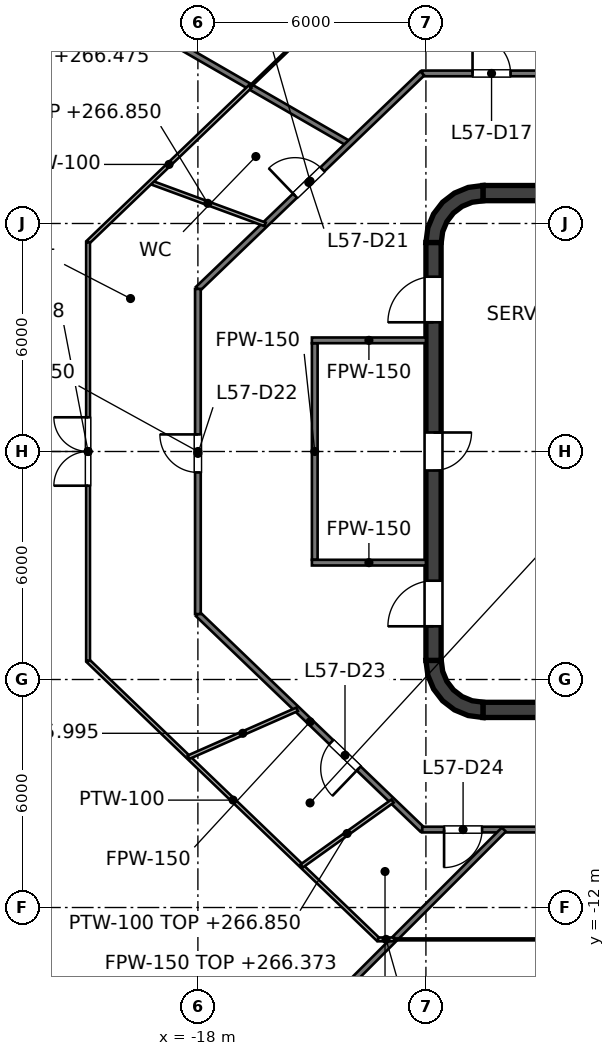
"""IFC4 building model, lengths in metres.
Left out: names, types, materials, properties, quantities, classifications, styles, units other than length and angle.
Written with IfcOpenShell. Run it as: python <this file> out.ifc"""

import sys

from ifc_helpers import new_model, si_unit, direction, frame, frame_2d, origin, place, context, subcontext, project, spatial, polyline, rectangle, outline, extrude, element, fill, save


model = new_model("IFC4")
c1 = context("Model", 3, precision=1e-05, world=origin(), true_north=direction((0.0, 1.0)))
c2 = subcontext(c1, "Body", "Model", "MODEL_VIEW")
j1 = project(units=[si_unit("LENGTHUNIT", "METRE"), si_unit("PLANEANGLEUNIT", "RADIAN")], contexts=[c1])
p1 = place(None, origin())
s1 = spatial("IfcSite", under=j1, at=p1, CompositionType="ELEMENT")
p2 = place(p1, origin())
s2 = spatial("IfcBuilding", under=s1, at=p2, CompositionType="ELEMENT")
p3 = place(p2, frame((0.0, 0.0, 263.0)))
s3 = spatial("IfcBuildingStorey", under=s2, at=p3, CompositionType="ELEMENT", Elevation=263.0)
for number, where, z_axis, x_axis in (
    (1, (-10.5, 6.8, 0.0), (0.0, 0.0, 1.0), (1.0, 0.0, 0.0)),
    (2, (-10.5, -6.8, 0.0), (0.0, 0.0, 1.0), (1.0, 0.0, 0.0)),
):
    element("IfcWall", number, at=place(p3, frame(where, z_axis=z_axis, x_axis=x_axis)), inside=s3, PredefinedType="SHEAR", context=c2, shape_type="SweptSolid", body=[
        extrude(rectangle(XDim=21.0, YDim=0.4, at=frame_2d((10.5, 0.0))), origin(), (0.0, 0.0, 1.0), 4.0),
    ])
p4 = place(p3, frame((-11.8, -5.5, 0.0), z_axis=(0.0, 0.0, 1.0), x_axis=(0.0, 1.0, 0.0)))
e3 = element("IfcWall", 3, at=p4, inside=s3, PredefinedType="SHEAR", context=c2, shape_type="SweptSolid", body=[
    extrude(rectangle(XDim=11.0, YDim=0.4, at=frame_2d((5.5, 0.0))), origin(), (0.0, 0.0, 1.0), 4.0),
])
p5 = place(p4, frame((5.0, 0.0, 0.0)))
e4 = element("IfcOpeningElement", 4, at=p5, cuts=e3, PredefinedType="OPENING", context=c2, shape_type="SweptSolid", body=[
    extrude(rectangle(XDim=1.0, YDim=2.1, at=frame_2d((0.5, 1.05))), frame((0.0, 0.2, 0.0), z_axis=(0.0, -1.0, 0.0), x_axis=(1.0, 0.0, 0.0)), (0.0, 0.0, 1.0), 0.4),
])
p6 = place(p4, frame((0.9, 0.0, 0.0)))
e5 = element("IfcOpeningElement", 5, at=p6, cuts=e3, PredefinedType="OPENING", context=c2, shape_type="SweptSolid", body=[
    extrude(rectangle(XDim=1.2, YDim=2.1, at=frame_2d((0.6, 1.05))), frame((0.0, 0.2, 0.0), z_axis=(0.0, -1.0, 0.0), x_axis=(1.0, 0.0, 0.0)), (0.0, 0.0, 1.0), 0.4),
])
p7 = place(p4, frame((8.9, 0.0, 0.0)))
e6 = element("IfcOpeningElement", 6, at=p7, cuts=e3, PredefinedType="OPENING", context=c2, shape_type="SweptSolid", body=[
    extrude(rectangle(XDim=1.2, YDim=2.1, at=frame_2d((0.6, 1.05))), frame((0.0, 0.2, 0.0), z_axis=(0.0, -1.0, 0.0), x_axis=(1.0, 0.0, 0.0)), (0.0, 0.0, 1.0), 0.4),
])
p8 = place(p3, origin())
e7 = element("IfcWall", 7, at=p8, inside=s3, PredefinedType="SHEAR", context=c2, shape_type="SweptSolid", body=[
    extrude(outline(polyline([(-12.0, 5.5), (-11.596, 5.5), (-11.559, 5.784), (-11.45, 6.048), (-11.275, 6.275), (-11.048, 6.45), (-10.784, 6.559), (-10.5, 6.596), (-10.5, 7.0), (-10.888, 6.949), (-11.25, 6.799), (-11.561, 6.561), (-11.799, 6.25), (-11.949, 5.888), (-12.0, 5.5)])), origin(), (0.0, 0.0, 1.0), 4.0),
])
e8 = element("IfcWall", 8, at=p8, inside=s3, PredefinedType="SHEAR", context=c2, shape_type="SweptSolid", body=[
    extrude(outline(polyline([(-10.5, -7.0), (-10.5, -6.596), (-10.784, -6.559), (-11.048, -6.45), (-11.275, -6.275), (-11.45, -6.048), (-11.559, -5.784), (-11.596, -5.5), (-12.0, -5.5), (-11.949, -5.888), (-11.799, -6.25), (-11.561, -6.561), (-11.25, -6.799), (-10.888, -6.949), (-10.5, -7.0)])), origin(), (0.0, 0.0, 1.0), 4.0),
])
p9 = place(p3, frame((-14.925, -2.85, 0.0), z_axis=(0.0, 0.0, 1.0), x_axis=(0.0, 1.0, 0.0)))
e9 = element("IfcWall", 9, at=p9, inside=s3, PredefinedType="PARTITIONING", context=c2, shape_type="SweptSolid", body=[
    extrude(rectangle(XDim=5.7, YDim=0.15, at=frame_2d((2.85, 0.0))), origin(), (0.0, 0.0, 1.0), 2.918),
])
for number, where, z_axis, x_axis in (
    (10, (-15.0, 2.925, 0.0), (0.0, 0.0, 1.0), (1.0, 0.0, 0.0)),
    (11, (-15.0, -2.925, 0.0), (0.0, 0.0, 1.0), (1.0, 0.0, 0.0)),
):
    element("IfcWall", number, at=place(p3, frame(where, z_axis=z_axis, x_axis=x_axis)), inside=s3, PredefinedType="PARTITIONING", context=c2, shape_type="SweptSolid", body=[
        extrude(rectangle(XDim=3.0, YDim=0.15, at=frame_2d((1.5, 0.0))), origin(), (0.0, 0.0, 1.0), 2.918),
    ])
p10 = place(p3, frame((-18.0, -4.278, 0.0), z_axis=(0.0, 0.0, 1.0), x_axis=(0.721290181137, -0.692633001376, 0.0)))
e12 = element("IfcWall", 12, at=p10, inside=s3, PredefinedType="PARTITIONING", context=c2, shape_type="SweptSolid", body=[
    extrude(rectangle(XDim=8.187, YDim=0.15, at=frame_2d((4.094, 0.0))), origin(), (0.0, 0.0, 1.0), 2.918),
])
p11 = place(p10, frame((4.866, 0.0, 0.0)))
e13 = element("IfcOpeningElement", 13, at=p11, cuts=e12, PredefinedType="OPENING", context=c2, shape_type="SweptSolid", body=[
    extrude(rectangle(XDim=1.0, YDim=2.1, at=frame_2d((0.5, 1.05))), frame((0.0, 0.075, 0.0), z_axis=(0.0, -1.0, 0.0), x_axis=(1.0, 0.0, 0.0)), (0.0, 0.0, 1.0), 0.15),
])
p12 = place(p3, frame((-23.976, 13.843, 0.0), z_axis=(0.0, 0.0, 1.0), x_axis=(0.866017183011, -0.500014238528, 0.0)))
e14 = element("IfcWall", 14, at=p12, inside=s3, PredefinedType="PARTITIONING", context=c2, shape_type="SweptSolid", body=[
    extrude(rectangle(XDim=11.492, YDim=0.15, at=frame_2d((5.746, 0.0))), origin(), (0.0, 0.0, 1.0), 3.475),
])
p13 = place(p3, frame((-12.095, -9.949, 0.0), z_axis=(0.0, 0.0, 1.0), x_axis=(1.0, 0.0, 0.0)))
e15 = element("IfcWall", 15, at=p13, inside=s3, PredefinedType="PARTITIONING", context=c2, shape_type="SweptSolid", body=[
    extrude(rectangle(XDim=24.19, YDim=0.15, at=frame_2d((12.095, 0.0))), origin(), (0.0, 0.0, 1.0), 2.927),
])
p14 = place(p13, frame((0.573, 0.0, 0.0)))
e16 = element("IfcOpeningElement", 16, at=p14, cuts=e15, PredefinedType="OPENING", context=c2, shape_type="SweptSolid", body=[
    extrude(rectangle(XDim=1.0, YDim=2.1, at=frame_2d((0.5, 1.05))), frame((0.0, 0.075, 0.0), z_axis=(0.0, -1.0, 0.0), x_axis=(1.0, 0.0, 0.0)), (0.0, 0.0, 1.0), 0.15),
])
p15 = place(p13, frame((5.966, 0.0, 0.0)))
e17 = element("IfcOpeningElement", 17, at=p15, cuts=e15, PredefinedType="OPENING", context=c2, shape_type="SweptSolid", body=[
    extrude(rectangle(XDim=1.0, YDim=2.1, at=frame_2d((0.5, 1.05))), frame((0.0, 0.075, 0.0), z_axis=(0.0, -1.0, 0.0), x_axis=(1.0, 0.0, 0.0)), (0.0, 0.0, 1.0), 0.15),
])
p16 = place(p13, frame((13.812, 0.0, 0.0)))
e18 = element("IfcOpeningElement", 18, at=p16, cuts=e15, PredefinedType="OPENING", context=c2, shape_type="SweptSolid", body=[
    extrude(rectangle(XDim=1.0, YDim=2.1, at=frame_2d((0.5, 1.05))), frame((0.0, 0.075, 0.0), z_axis=(0.0, -1.0, 0.0), x_axis=(1.0, 0.0, 0.0)), (0.0, 0.0, 1.0), 0.15),
])
p17 = place(p13, frame((19.879, 0.0, 0.0)))
e19 = element("IfcOpeningElement", 19, at=p17, cuts=e15, PredefinedType="OPENING", context=c2, shape_type="SweptSolid", body=[
    extrude(rectangle(XDim=1.0, YDim=2.1, at=frame_2d((0.5, 1.05))), frame((0.0, 0.075, 0.0), z_axis=(0.0, -1.0, 0.0), x_axis=(1.0, 0.0, 0.0)), (0.0, 0.0, 1.0), 0.15),
])
p18 = place(p3, frame((-12.095, 9.949, 0.0), z_axis=(0.0, 0.0, 1.0), x_axis=(1.0, 0.0, 0.0)))
e20 = element("IfcWall", 20, at=p18, inside=s3, PredefinedType="PARTITIONING", context=c2, shape_type="SweptSolid", body=[
    extrude(rectangle(XDim=24.19, YDim=0.15, at=frame_2d((12.095, 0.0))), origin(), (0.0, 0.0, 1.0), 2.927),
])
p19 = place(p18, frame((9.784, 0.0, 0.0)))
e21 = element("IfcOpeningElement", 21, at=p19, cuts=e20, PredefinedType="OPENING", context=c2, shape_type="SweptSolid", body=[
    extrude(rectangle(XDim=1.0, YDim=2.1, at=frame_2d((0.5, 1.05))), frame((0.0, 0.075, 0.0), z_axis=(0.0, -1.0, 0.0), x_axis=(1.0, 0.0, 0.0)), (0.0, 0.0, 1.0), 0.15),
])
p20 = place(p18, frame((5.56, 0.0, 0.0)))
e22 = element("IfcOpeningElement", 22, at=p20, cuts=e20, PredefinedType="OPENING", context=c2, shape_type="SweptSolid", body=[
    extrude(rectangle(XDim=1.0, YDim=2.1, at=frame_2d((0.5, 1.05))), frame((0.0, 0.075, 0.0), z_axis=(0.0, -1.0, 0.0), x_axis=(1.0, 0.0, 0.0)), (0.0, 0.0, 1.0), 0.15),
])
p21 = place(p18, frame((1.322, 0.0, 0.0)))
e23 = element("IfcOpeningElement", 23, at=p21, cuts=e20, PredefinedType="OPENING", context=c2, shape_type="SweptSolid", body=[
    extrude(rectangle(XDim=1.0, YDim=2.1, at=frame_2d((0.5, 1.05))), frame((0.0, 0.075, 0.0), z_axis=(0.0, -1.0, 0.0), x_axis=(1.0, 0.0, 0.0)), (0.0, 0.0, 1.0), 0.15),
])
p22 = place(p18, frame((19.104, 0.0, 0.0)))
e24 = element("IfcOpeningElement", 24, at=p22, cuts=e20, PredefinedType="OPENING", context=c2, shape_type="SweptSolid", body=[
    extrude(rectangle(XDim=1.0, YDim=2.1, at=frame_2d((0.5, 1.05))), frame((0.0, 0.075, 0.0), z_axis=(0.0, -1.0, 0.0), x_axis=(1.0, 0.0, 0.0)), (0.0, 0.0, 1.0), 0.15),
])
p23 = place(p18, frame((14.129, 0.0, 0.0)))
e25 = element("IfcOpeningElement", 25, at=p23, cuts=e20, PredefinedType="OPENING", context=c2, shape_type="SweptSolid", body=[
    extrude(rectangle(XDim=1.0, YDim=2.1, at=frame_2d((0.5, 1.05))), frame((0.0, 0.075, 0.0), z_axis=(0.0, -1.0, 0.0), x_axis=(1.0, 0.0, 0.0)), (0.0, 0.0, 1.0), 0.15),
])
p24 = place(p3, frame((-18.0, 4.278, 0.0), z_axis=(0.0, 0.0, 1.0), x_axis=(0.721260976692, 0.69266341285, 0.0)))
e26 = element("IfcWall", 26, at=p24, inside=s3, PredefinedType="PARTITIONING", context=c2, shape_type="SweptSolid", body=[
    extrude(rectangle(XDim=8.187, YDim=0.15, at=frame_2d((4.094, 0.0))), origin(), (0.0, 0.0, 1.0), 2.918),
])
p25 = place(p24, frame((3.544, 0.0, 0.0)))
e27 = element("IfcOpeningElement", 27, at=p25, cuts=e26, PredefinedType="OPENING", context=c2, shape_type="SweptSolid", body=[
    extrude(rectangle(XDim=1.0, YDim=2.1, at=frame_2d((0.5, 1.05))), frame((0.0, 0.075, 0.0), z_axis=(0.0, -1.0, 0.0), x_axis=(1.0, 0.0, 0.0)), (0.0, 0.0, 1.0), 0.15),
])
p26 = place(p3, frame((-18.206, -18.206, 0.0), z_axis=(0.0, 0.0, 1.0), x_axis=(0.707106781187, 0.707106781187, 0.0)))
e28 = element("IfcWall", 28, at=p26, inside=s3, PredefinedType="PARTITIONING", context=c2, shape_type="SweptSolid", body=[
    extrude(rectangle(XDim=11.677, YDim=0.15, at=frame_2d((5.839, 0.0))), origin(), (0.0, 0.0, 1.0), 3.373),
])
p27 = place(p3, frame((-18.0, -4.278, 0.0), z_axis=(0.0, 0.0, 1.0), x_axis=(0.0, 1.0, 0.0)))
e29 = element("IfcWall", 29, at=p27, inside=s3, PredefinedType="PARTITIONING", context=c2, shape_type="SweptSolid", body=[
    extrude(rectangle(XDim=8.556, YDim=0.15, at=frame_2d((4.278, 0.0))), origin(), (0.0, 0.0, 1.0), 2.918),
])
p28 = place(p27, frame((3.728, 0.0, 0.0)))
e30 = element("IfcOpeningElement", 30, at=p28, cuts=e29, PredefinedType="OPENING", context=c2, shape_type="SweptSolid", body=[
    extrude(rectangle(XDim=1.0, YDim=2.1, at=frame_2d((0.5, 1.05))), frame((0.0, 0.075, 0.0), z_axis=(0.0, -1.0, 0.0), x_axis=(1.0, 0.0, 0.0)), (0.0, 0.0, 1.0), 0.15),
])
p29 = place(p3, frame((-10.773, 12.839, 0.0), z_axis=(0.0, 0.0, 1.0), x_axis=(0.642777681898, -0.766052773413, 0.0)))
e31 = element("IfcWall", 31, at=p29, inside=s3, PredefinedType="PARTITIONING", context=c2, shape_type="SweptSolid", body=[
    extrude(rectangle(XDim=3.773, YDim=0.05, at=frame_2d((1.886, 0.0))), origin(), (0.0, 0.0, 1.0), 3.85),
])
p30 = place(p3, frame((-12.839, -12.839, 0.0), z_axis=(0.0, 0.0, 1.0), x_axis=(1.0, 0.0, 0.0)))
e32 = element("IfcWall", 32, at=p30, inside=s3, PredefinedType="PARTITIONING", context=c2, shape_type="SweptSolid", body=[
    extrude(rectangle(XDim=20.252, YDim=0.05, at=frame_2d((10.126, 0.0))), origin(), (0.0, 0.0, 1.0), 2.927),
])
p31 = place(p30, frame((5.024, 0.0, 0.0)))
e33 = element("IfcOpeningElement", 33, at=p31, cuts=e32, PredefinedType="OPENING", context=c2, shape_type="SweptSolid", body=[
    extrude(rectangle(XDim=1.0, YDim=2.1, at=frame_2d((0.5, 1.05))), frame((0.0, 0.025, 0.0), z_axis=(0.0, -1.0, 0.0), x_axis=(1.0, 0.0, 0.0)), (0.0, 0.0, 1.0), 0.05),
])
p32 = place(p30, frame((16.045, 0.0, 0.0)))
e34 = element("IfcOpeningElement", 34, at=p32, cuts=e32, PredefinedType="OPENING", context=c2, shape_type="SweptSolid", body=[
    extrude(rectangle(XDim=1.0, YDim=2.1, at=frame_2d((0.5, 1.05))), frame((0.0, 0.025, 0.0), z_axis=(0.0, -1.0, 0.0), x_axis=(1.0, 0.0, 0.0)), (0.0, 0.0, 1.0), 0.05),
])
p33 = place(p3, frame((-16.629, 9.601, 0.0), z_axis=(0.0, 0.0, 1.0), x_axis=(0.721171224294, 0.692756858681, 0.0)))
e35 = element("IfcWall", 35, at=p33, inside=s3, PredefinedType="PARTITIONING", context=c2, shape_type="SweptSolid", body=[
    extrude(rectangle(XDim=4.674, YDim=0.05, at=frame_2d((2.337, 0.0))), origin(), (0.0, 0.0, 1.0), 2.927),
])
p34 = place(p33, frame((1.837, 0.0, 0.0)))
e36 = element("IfcOpeningElement", 36, at=p34, cuts=e35, PredefinedType="OPENING", context=c2, shape_type="SweptSolid", body=[
    extrude(rectangle(XDim=1.0, YDim=2.1, at=frame_2d((0.5, 1.05))), frame((0.0, 0.025, 0.0), z_axis=(0.0, -1.0, 0.0), x_axis=(1.0, 0.0, 0.0)), (0.0, 0.0, 1.0), 0.05),
])
p35 = place(p3, frame((-20.89, -5.509, 0.0), z_axis=(0.0, 0.0, 1.0), x_axis=(0.721243919182, -0.692681174166, 0.0)))
e37 = element("IfcWall", 37, at=p35, inside=s3, PredefinedType="PARTITIONING", context=c2, shape_type="SweptSolid", body=[
    extrude(rectangle(XDim=10.582, YDim=0.1, at=frame_2d((5.291, 0.0))), origin(), (0.0, 0.0, 1.0), 2.927),
])
p36 = place(p3, frame((-19.247, 7.086, 0.0), z_axis=(0.0, 0.0, 1.0), x_axis=(0.938441676653, -0.345437721625, 0.0)))
e38 = element("IfcWall", 38, at=p36, inside=s3, PredefinedType="PARTITIONING", context=c2, shape_type="SweptSolid", body=[
    extrude(rectangle(XDim=3.213, YDim=0.1, at=frame_2d((1.606, 0.0))), origin(), (0.0, 0.0, 1.0), 3.85),
])
p37 = place(p3, frame((-13.258, -12.839, 0.0), z_axis=(0.0, 0.0, 1.0), x_axis=(1.0, 0.0, 0.0)))
e39 = element("IfcWall", 39, at=p37, inside=s3, PredefinedType="PARTITIONING", context=c2, shape_type="SweptSolid", body=[
    extrude(rectangle(XDim=0.419, YDim=0.1, at=frame_2d((0.209, 0.0))), origin(), (0.0, 0.0, 1.0), 3.85),
])
p38 = place(p3, frame((-18.249, -8.046, 0.0), z_axis=(0.0, 0.0, 1.0), x_axis=(0.915015337029, 0.403419053841, 0.0)))
e40 = element("IfcWall", 40, at=p38, inside=s3, PredefinedType="PARTITIONING", context=c2, shape_type="SweptSolid", body=[
    extrude(rectangle(XDim=3.126, YDim=0.1, at=frame_2d((1.563, 0.0))), origin(), (0.0, 0.0, 1.0), 2.995),
])
p39 = place(p3, frame((-15.27, -10.907, 0.0), z_axis=(0.0, 0.0, 1.0), x_axis=(0.813789563909, 0.581159655923, 0.0)))
e41 = element("IfcWall", 41, at=p39, inside=s3, PredefinedType="PARTITIONING", context=c2, shape_type="SweptSolid", body=[
    extrude(rectangle(XDim=2.941, YDim=0.1, at=frame_2d((1.47, 0.0))), origin(), (0.0, 0.0, 1.0), 3.85),
])
p40 = place(p3, frame((-20.89, 5.509, 0.0), z_axis=(0.0, 0.0, 1.0), x_axis=(0.721443476428, 0.692473328237, 0.0)))
e42 = element("IfcWall", 42, at=p40, inside=s3, PredefinedType="PARTITIONING", context=c2, shape_type="SweptSolid", body=[
    extrude(rectangle(XDim=5.907, YDim=0.1, at=frame_2d((2.954, 0.0))), origin(), (0.0, 0.0, 1.0), 2.927),
])
p41 = place(p3, frame((-20.89, -5.509, 0.0), z_axis=(0.0, 0.0, 1.0), x_axis=(0.0, 1.0, 0.0)))
e43 = element("IfcWall", 43, at=p41, inside=s3, PredefinedType="PARTITIONING", context=c2, shape_type="SweptSolid", body=[
    extrude(rectangle(XDim=11.018, YDim=0.1, at=frame_2d((5.509, 0.0))), origin(), (0.0, 0.0, 1.0), 2.918),
])
p42 = place(p41, frame((4.609, 0.0, 0.0)))
e44 = element("IfcOpeningElement", 44, at=p42, cuts=e43, PredefinedType="OPENING", context=c2, shape_type="SweptSolid", body=[
    extrude(rectangle(XDim=1.8, YDim=2.1, at=frame_2d((0.9, 1.05))), frame((0.0, 0.05, 0.0), z_axis=(0.0, -1.0, 0.0), x_axis=(1.0, 0.0, 0.0)), (0.0, 0.0, 1.0), 0.1),
])
p43 = place(p5, origin())
e45 = element("IfcDoor", 45, at=p43, inside=s3, OperationType="SINGLE_SWING_RIGHT", PredefinedType="DOOR", context=c2, shape_type="SweptSolid", body=[
    extrude(rectangle(XDim=1.0, YDim=2.1, at=frame_2d((0.5, 1.05))), frame((0.0, 0.025, 0.0), z_axis=(0.0, -1.0, 0.0), x_axis=(1.0, 0.0, 0.0)), (0.0, 0.0, 1.0), 0.05),
])
fill(e4, e45)
p44 = place(p6, origin())
e46 = element("IfcDoor", 46, at=p44, inside=s3, OperationType="SINGLE_SWING_LEFT", PredefinedType="DOOR", context=c2, shape_type="SweptSolid", body=[
    extrude(rectangle(XDim=1.2, YDim=2.1, at=frame_2d((0.6, 1.05))), frame((0.0, 0.025, 0.0), z_axis=(0.0, -1.0, 0.0), x_axis=(1.0, 0.0, 0.0)), (0.0, 0.0, 1.0), 0.05),
])
fill(e5, e46)
p45 = place(p7, origin())
e47 = element("IfcDoor", 47, at=p45, inside=s3, OperationType="SINGLE_SWING_LEFT", PredefinedType="DOOR", context=c2, shape_type="SweptSolid", body=[
    extrude(rectangle(XDim=1.2, YDim=2.1, at=frame_2d((0.6, 1.05))), frame((0.0, 0.025, 0.0), z_axis=(0.0, -1.0, 0.0), x_axis=(1.0, 0.0, 0.0)), (0.0, 0.0, 1.0), 0.05),
])
fill(e6, e47)
p46 = place(p21, origin())
e48 = element("IfcDoor", 48, at=p46, inside=s3, OperationType="SINGLE_SWING_LEFT", PredefinedType="DOOR", context=c2, shape_type="SweptSolid", body=[
    extrude(rectangle(XDim=1.0, YDim=2.1, at=frame_2d((0.5, 1.05))), frame((0.0, 0.025, 0.0), z_axis=(0.0, -1.0, 0.0), x_axis=(1.0, 0.0, 0.0)), (0.0, 0.0, 1.0), 0.05),
])
fill(e23, e48)
p47 = place(p25, origin())
e49 = element("IfcDoor", 49, at=p47, inside=s3, OperationType="SINGLE_SWING_LEFT", PredefinedType="DOOR", context=c2, shape_type="SweptSolid", body=[
    extrude(rectangle(XDim=1.0, YDim=2.1, at=frame_2d((0.5, 1.05))), frame((0.0, 0.025, 0.0), z_axis=(0.0, -1.0, 0.0), x_axis=(1.0, 0.0, 0.0)), (0.0, 0.0, 1.0), 0.05),
])
fill(e27, e49)
p48 = place(p28, origin())
e50 = element("IfcDoor", 50, at=p48, inside=s3, OperationType="SINGLE_SWING_RIGHT", PredefinedType="DOOR", context=c2, shape_type="SweptSolid", body=[
    extrude(rectangle(XDim=1.0, YDim=2.1, at=frame_2d((0.5, 1.05))), frame((0.0, 0.025, 0.0), z_axis=(0.0, -1.0, 0.0), x_axis=(1.0, 0.0, 0.0)), (0.0, 0.0, 1.0), 0.05),
])
fill(e30, e50)
p49 = place(p11, origin())
e51 = element("IfcDoor", 51, at=p49, inside=s3, OperationType="SINGLE_SWING_RIGHT", PredefinedType="DOOR", context=c2, shape_type="SweptSolid", body=[
    extrude(rectangle(XDim=1.0, YDim=2.1, at=frame_2d((0.5, 1.05))), frame((0.0, 0.025, 0.0), z_axis=(0.0, -1.0, 0.0), x_axis=(1.0, 0.0, 0.0)), (0.0, 0.0, 1.0), 0.05),
])
fill(e13, e51)
p50 = place(p14, origin())
e52 = element("IfcDoor", 52, at=p50, inside=s3, OperationType="SINGLE_SWING_LEFT", PredefinedType="DOOR", context=c2, shape_type="SweptSolid", body=[
    extrude(rectangle(XDim=1.0, YDim=2.1, at=frame_2d((0.5, 1.05))), frame((0.0, 0.025, 0.0), z_axis=(0.0, -1.0, 0.0), x_axis=(1.0, 0.0, 0.0)), (0.0, 0.0, 1.0), 0.05),
])
fill(e16, e52)
p51 = place(p42, origin())
e53 = element("IfcDoor", 53, at=p51, inside=s3, OperationType="DOUBLE_DOOR_SINGLE_SWING", PredefinedType="DOOR", context=c2, shape_type="SweptSolid", body=[
    extrude(rectangle(XDim=1.8, YDim=2.1, at=frame_2d((0.9, 1.05))), frame((0.0, 0.025, 0.0), z_axis=(0.0, -1.0, 0.0), x_axis=(1.0, 0.0, 0.0)), (0.0, 0.0, 1.0), 0.05),
])
fill(e44, e53)
save(model, sys.argv[1])
